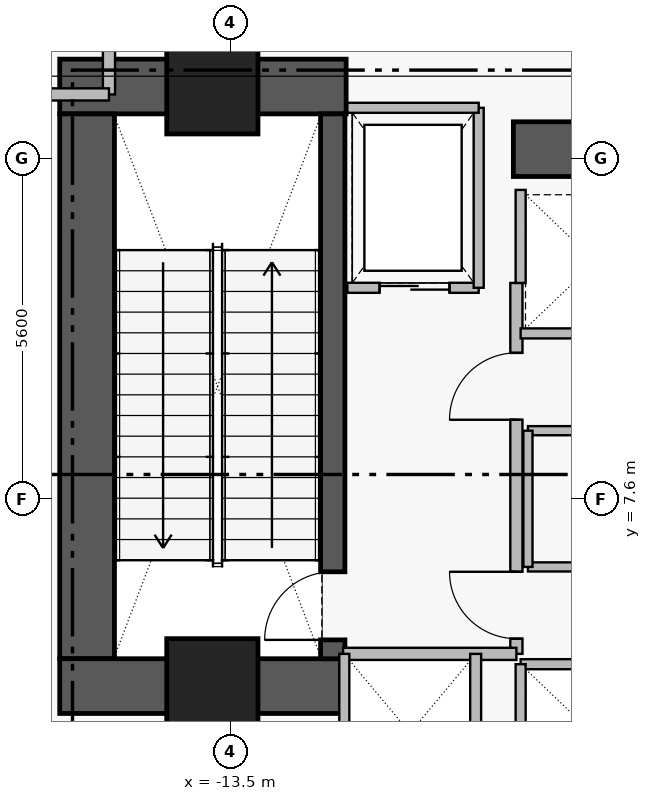
"""IFC4 building model, lengths in metres.
Left out: names, types, materials, properties, quantities, classifications, styles, units other than length and angle.
Written with IfcOpenShell. Run it as: python <this file> out.ifc"""

import sys

from ifc_helpers import new_model, si_unit, direction, frame, frame_2d, origin, origin_2d, place, context, subcontext, project, spatial, rectangle, extrude, element, fill, save


model = new_model("IFC4")
c1 = context("Model", 3, precision=1e-05, world=origin(), true_north=direction((0.0, 1.0)))
c2 = subcontext(c1, "Body", "Model", "MODEL_VIEW")
j1 = project(units=[si_unit("LENGTHUNIT", "METRE"), si_unit("PLANEANGLEUNIT", "RADIAN")], contexts=[c1])
p1 = place(None, origin())
s1 = spatial("IfcSite", under=j1, at=p1, CompositionType="ELEMENT")
p2 = place(p1, origin())
s2 = spatial("IfcBuilding", under=s1, at=p2, CompositionType="ELEMENT")
p3 = place(p2, frame((0.0, 0.0, 89.65)))
s3 = spatial("IfcBuildingStorey", under=s2, at=p3, CompositionType="ELEMENT", Elevation=89.65)
p4 = place(p3, frame((-16.31, 14.38, 0.0), z_axis=(0.0, 0.0, 1.0), x_axis=(1.0, 0.0, 0.0)))
e1 = element("IfcWall", 1, at=p4, inside=s3, PredefinedType="SHEAR", context=c2, shape_type="SweptSolid", body=[
    extrude(rectangle(XDim=4.71, YDim=0.9, at=frame_2d((2.355, 0.0))), origin(), (0.0, 0.0, 1.0), 5.81),
])
p5 = place(p3, frame((-15.86, 4.97, 0.0), z_axis=(0.0, 0.0, 1.0), x_axis=(0.0, 1.0, 0.0)))
e2 = element("IfcWall", 2, at=p5, inside=s3, PredefinedType="SHEAR", context=c2, shape_type="SweptSolid", body=[
    extrude(rectangle(XDim=8.96, YDim=0.9, at=frame_2d((4.48, 0.0))), origin(), (0.0, 0.0, 1.0), 5.81),
])
p6 = place(p3, frame((-16.31, 4.52, 0.0), z_axis=(0.0, 0.0, 1.0), x_axis=(1.0, 0.0, 0.0)))
e3 = element("IfcWall", 3, at=p6, inside=s3, PredefinedType="SHEAR", context=c2, shape_type="SweptSolid", body=[
    extrude(rectangle(XDim=4.71, YDim=0.9, at=frame_2d((2.355, 0.0))), origin(), (0.0, 0.0, 1.0), 5.81),
])
p7 = place(p3, frame((-8.85, 13.35, 0.0), z_axis=(0.0, 0.0, 1.0), x_axis=(1.0, 0.0, 0.0)))
e4 = element("IfcWall", 4, at=p7, inside=s3, PredefinedType="SHEAR", context=c2, shape_type="SweptSolid", body=[
    extrude(rectangle(XDim=7.6, YDim=0.9, at=frame_2d((3.8, 0.0))), origin(), (0.0, 0.0, 1.0), 5.74),
])
p8 = place(p3, frame((-11.82, 4.97, 0.0), z_axis=(0.0, 0.0, 1.0), x_axis=(0.0, 1.0, 0.0)))
e5 = element("IfcWall", 5, at=p8, inside=s3, PredefinedType="SHEAR", context=c2, shape_type="SweptSolid", body=[
    extrude(rectangle(XDim=8.96, YDim=0.4, at=frame_2d((4.48, 0.0))), origin(), (0.0, 0.0, 1.0), 5.81),
])
p9 = place(p8, frame((0.31, 0.0, 0.0)))
e6 = element("IfcOpeningElement", 6, at=p9, cuts=e5, PredefinedType="OPENING", context=c2, shape_type="SweptSolid", body=[
    extrude(rectangle(XDim=1.12, YDim=2.22, at=frame_2d((0.56, 1.11))), frame((0.0, 0.21, 0.0), z_axis=(0.0, -1.0, 0.0), x_axis=(1.0, 0.0, 0.0)), (0.0, 0.0, 1.0), 0.42),
])
for number, where, z_axis, x_axis in (
    (7, (-13.8, 14.35, 0.0), (0.0, 0.0, 1.0), (1.0, 0.0, 0.0)),
    (8, (-13.8, 4.55, 0.0), (0.0, 0.0, 1.0), (1.0, 0.0, 0.0)),
):
    element("IfcColumn", number, at=place(p3, frame(where, z_axis=z_axis, x_axis=x_axis)), inside=s3, PredefinedType="COLUMN", context=c2, shape_type="SweptSolid", body=[
        extrude(rectangle(XDim=1.5, YDim=1.5, at=origin_2d()), origin(), (0.0, 0.0, 1.0), 6.0),
    ])
p10 = place(p3, frame((-8.8, 5.05, 0.0), z_axis=(0.0, 0.0, 1.0), x_axis=(0.0, 1.0, 0.0)))
e9 = element("IfcWall", 9, at=p10, inside=s3, PredefinedType="PARTITIONING", context=c2, shape_type="SweptSolid", body=[
    extrude(rectangle(XDim=6.1, YDim=0.2, at=frame_2d((3.05, 0.0))), origin(), (0.0, 0.0, 1.0), 5.74),
])
p11 = place(p10, frame((0.25, 0.0, 0.0)))
e10 = element("IfcOpeningElement", 10, at=p11, cuts=e9, PredefinedType="OPENING", context=c2, shape_type="SweptSolid", body=[
    extrude(rectangle(XDim=1.1, YDim=2.2, at=frame_2d((0.55, 1.1))), frame((0.0, 0.11, 0.0), z_axis=(0.0, -1.0, 0.0), x_axis=(1.0, 0.0, 0.0)), (0.0, 0.0, 1.0), 0.22),
])
p12 = place(p10, frame((3.85, 0.0, 0.0)))
e11 = element("IfcOpeningElement", 11, at=p12, cuts=e9, PredefinedType="OPENING", context=c2, shape_type="SweptSolid", body=[
    extrude(rectangle(XDim=1.1, YDim=2.2, at=frame_2d((0.55, 1.1))), frame((0.0, 0.11, 0.0), z_axis=(0.0, -1.0, 0.0), x_axis=(1.0, 0.0, 0.0)), (0.0, 0.0, 1.0), 0.22),
])
p13 = place(p3, frame((-11.58, 11.07, 0.0), z_axis=(0.0, 0.0, 1.0), x_axis=(1.0, 0.0, 0.0)))
e12 = element("IfcWall", 12, at=p13, inside=s3, PredefinedType="PARTITIONING", context=c2, shape_type="SweptSolid", body=[
    extrude(rectangle(XDim=2.16, YDim=0.165, at=frame_2d((1.08, 0.0))), origin(), (0.0, 0.0, 1.0), 5.74),
])
p14 = place(p13, frame((0.53, 0.0, 0.0)))
e13 = element("IfcOpeningElement", 13, at=p14, cuts=e12, PredefinedType="OPENING", context=c2, shape_type="SweptSolid", body=[
    extrude(rectangle(XDim=1.15, YDim=2.25, at=frame_2d((0.575, 1.125))), frame((0.0, 0.093, 0.0), z_axis=(0.0, -1.0, 0.0), x_axis=(1.0, 0.0, 0.0)), (0.0, 0.0, 1.0), 0.185),
])
p15 = place(p3, frame((-8.61, 6.48, 0.0), z_axis=(0.0, 0.0, 1.0), x_axis=(1.0, 0.0, 0.0)))
e14 = element("IfcWall", 14, at=p15, inside=s3, PredefinedType="PARTITIONING", context=c2, shape_type="SweptSolid", body=[
    extrude(rectangle(XDim=7.29, YDim=0.15, at=frame_2d((3.645, 0.0))), origin(), (0.0, 0.0, 1.0), 5.74),
])
p16 = place(p15, frame((3.195, 0.0, 0.0)))
e15 = element("IfcOpeningElement", 15, at=p16, cuts=e14, PredefinedType="OPENING", context=c2, shape_type="SweptSolid", body=[
    extrude(rectangle(XDim=0.9, YDim=2.15, at=frame_2d((0.45, 1.075))), frame((0.0, 0.085, 0.0), z_axis=(0.0, -1.0, 0.0), x_axis=(1.0, 0.0, 0.0)), (0.0, 0.0, 1.0), 0.17),
])
p17 = place(p3, frame((-15.5, 14.25, 0.0), z_axis=(0.0, 0.0, 1.0), x_axis=(0.0, 1.0, 0.0)))
e16 = element("IfcWall", 16, at=p17, inside=s3, PredefinedType="PARTITIONING", context=c2, shape_type="SweptSolid", body=[
    extrude(rectangle(XDim=5.05, YDim=0.2, at=frame_2d((2.525, 0.0))), origin(), (0.0, 0.0, 1.0), 5.74),
])
p18 = place(p17, frame((1.25, 0.0, 0.0)))
e17 = element("IfcOpeningElement", 17, at=p18, cuts=e16, PredefinedType="OPENING", context=c2, shape_type="SweptSolid", body=[
    extrude(rectangle(XDim=1.1, YDim=2.2, at=frame_2d((0.55, 1.1))), frame((0.0, 0.11, 0.0), z_axis=(0.0, -1.0, 0.0), x_axis=(1.0, 0.0, 0.0)), (0.0, 0.0, 1.0), 0.22),
])
p19 = place(p3, frame((-11.65, 5.05, 0.0), z_axis=(0.0, 0.0, 1.0), x_axis=(1.0, 0.0, 0.0)))
e18 = element("IfcWall", 18, at=p19, inside=s3, PredefinedType="PARTITIONING", context=c2, shape_type="SweptSolid", body=[
    extrude(rectangle(XDim=2.85, YDim=0.2, at=frame_2d((1.425, 0.0))), origin(), (0.0, 0.0, 1.0), 5.74),
])
p20 = place(p3, frame((-9.42, 11.07, 0.0), z_axis=(0.0, 0.0, 1.0), x_axis=(0.0, 1.0, 0.0)))
e19 = element("IfcWall", 19, at=p20, inside=s3, PredefinedType="PARTITIONING", context=c2, shape_type="SweptSolid", body=[
    extrude(rectangle(XDim=2.96, YDim=0.165, at=frame_2d((1.48, 0.0))), origin(), (0.0, 0.0, 1.0), 5.74),
])
p21 = place(p3, frame((-11.58, 14.03, 0.0), z_axis=(0.0, 0.0, 1.0), x_axis=(1.0, 0.0, 0.0)))
e20 = element("IfcWall", 20, at=p21, inside=s3, PredefinedType="PARTITIONING", context=c2, shape_type="SweptSolid", body=[
    extrude(rectangle(XDim=2.16, YDim=0.165, at=frame_2d((1.08, 0.0))), origin(), (0.0, 0.0, 1.0), 5.74),
])
p22 = place(p3, frame((-8.73, 4.88, 0.0), z_axis=(0.0, 0.0, 1.0), x_axis=(1.0, 0.0, 0.0)))
e21 = element("IfcWall", 21, at=p22, inside=s3, PredefinedType="PARTITIONING", context=c2, shape_type="SweptSolid", body=[
    extrude(rectangle(XDim=2.48, YDim=0.165, at=frame_2d((1.24, 0.0))), origin(), (0.0, 0.0, 1.0), 5.74),
])
p23 = place(p3, frame((-8.73, 2.52, 0.0), z_axis=(0.0, 0.0, 1.0), x_axis=(0.0, 1.0, 0.0)))
e22 = element("IfcWall", 22, at=p23, inside=s3, PredefinedType="PARTITIONING", context=c2, shape_type="SweptSolid", body=[
    extrude(rectangle(XDim=2.36, YDim=0.165, at=frame_2d((1.18, 0.0))), origin(), (0.0, 0.0, 1.0), 5.74),
])
p24 = place(p3, frame((-8.73, 10.32, 0.0), z_axis=(0.0, 0.0, 1.0), x_axis=(1.0, 0.0, 0.0)))
e23 = element("IfcWall", 23, at=p24, inside=s3, PredefinedType="PARTITIONING", context=c2, shape_type="SweptSolid", body=[
    extrude(rectangle(XDim=2.48, YDim=0.165, at=frame_2d((1.24, 0.0))), origin(), (0.0, 0.0, 1.0), 5.74),
])
p25 = place(p3, frame((-8.73, 11.15, 0.0), z_axis=(0.0, 0.0, 1.0), x_axis=(0.0, 1.0, 0.0)))
e24 = element("IfcWall", 24, at=p25, inside=s3, PredefinedType="PARTITIONING", context=c2, shape_type="SweptSolid", body=[
    extrude(rectangle(XDim=1.53, YDim=0.165, at=frame_2d((0.765, 0.0))), origin(), (0.0, 0.0, 1.0), 5.74),
])
p26 = place(p3, frame((-9.47, 2.45, 0.0), z_axis=(0.0, 0.0, 1.0), x_axis=(0.0, 1.0, 0.0)))
e25 = element("IfcWall", 25, at=p26, inside=s3, PredefinedType="PARTITIONING", context=c2, shape_type="SweptSolid", body=[
    extrude(rectangle(XDim=2.6, YDim=0.18, at=frame_2d((1.3, 0.0))), origin(), (0.0, 0.0, 1.0), 5.74),
])
p27 = place(p3, frame((-11.63, 2.47, 0.0), z_axis=(0.0, 0.0, 1.0), x_axis=(0.0, 1.0, 0.0)))
e26 = element("IfcWall", 26, at=p27, inside=s3, PredefinedType="PARTITIONING", context=c2, shape_type="SweptSolid", body=[
    extrude(rectangle(XDim=2.58, YDim=0.165, at=frame_2d((1.29, 0.0))), origin(), (0.0, 0.0, 1.0), 5.74),
])
p28 = place(p3, frame((-8.61, 8.72, 0.0), z_axis=(0.0, 0.0, 1.0), x_axis=(1.0, 0.0, 0.0)))
e27 = element("IfcWall", 27, at=p28, inside=s3, PredefinedType="PARTITIONING", context=c2, shape_type="SweptSolid", body=[
    extrude(rectangle(XDim=7.29, YDim=0.15, at=frame_2d((3.645, 0.0))), origin(), (0.0, 0.0, 1.0), 5.74),
])
p29 = place(p3, frame((-8.61, 6.48, 0.0), z_axis=(0.0, 0.0, 1.0), x_axis=(0.0, 1.0, 0.0)))
e28 = element("IfcWall", 28, at=p29, inside=s3, PredefinedType="PARTITIONING", context=c2, shape_type="SweptSolid", body=[
    extrude(rectangle(XDim=2.24, YDim=0.15, at=frame_2d((1.12, 0.0))), origin(), (0.0, 0.0, 1.0), 5.74),
])
p30 = place(p3, frame((-20.5, 14.25, 0.0), z_axis=(0.0, 0.0, 1.0), x_axis=(1.0, 0.0, 0.0)))
e29 = element("IfcWall", 29, at=p30, inside=s3, PredefinedType="PARTITIONING", context=c2, shape_type="SweptSolid", body=[
    extrude(rectangle(XDim=5.0, YDim=0.2, at=frame_2d((2.5, 0.0))), origin(), (0.0, 0.0, 1.0), 5.74),
])
p31 = place(p9, origin())
e30 = element("IfcDoor", 30, at=p31, inside=s3, OperationType="SINGLE_SWING_LEFT", PredefinedType="DOOR", context=c2, shape_type="SweptSolid", body=[
    extrude(rectangle(XDim=1.12, YDim=2.22, at=frame_2d((0.56, 1.11))), frame((0.0, 0.025, 0.0), z_axis=(0.0, -1.0, 0.0), x_axis=(1.0, 0.0, 0.0)), (0.0, 0.0, 1.0), 0.05),
])
fill(e6, e30)
p32 = place(p11, origin())
e31 = element("IfcDoor", 31, at=p32, inside=s3, OperationType="SINGLE_SWING_RIGHT", PredefinedType="DOOR", context=c2, shape_type="SweptSolid", body=[
    extrude(rectangle(XDim=1.1, YDim=2.2, at=frame_2d((0.55, 1.1))), frame((0.0, 0.025, 0.0), z_axis=(0.0, -1.0, 0.0), x_axis=(1.0, 0.0, 0.0)), (0.0, 0.0, 1.0), 0.05),
])
fill(e10, e31)
p33 = place(p12, origin())
e32 = element("IfcDoor", 32, at=p33, inside=s3, OperationType="SINGLE_SWING_LEFT", PredefinedType="DOOR", context=c2, shape_type="SweptSolid", body=[
    extrude(rectangle(XDim=1.1, YDim=2.2, at=frame_2d((0.55, 1.1))), frame((0.0, 0.025, 0.0), z_axis=(0.0, -1.0, 0.0), x_axis=(1.0, 0.0, 0.0)), (0.0, 0.0, 1.0), 0.05),
])
fill(e11, e32)
p34 = place(p14, origin())
e33 = element("IfcDoor", 33, at=p34, inside=s3, OperationType="SLIDING_TO_LEFT", PredefinedType="DOOR", context=c2, shape_type="SweptSolid", body=[
    extrude(rectangle(XDim=1.15, YDim=2.25, at=frame_2d((0.575, 1.125))), frame((0.0, 0.025, 0.0), z_axis=(0.0, -1.0, 0.0), x_axis=(1.0, 0.0, 0.0)), (0.0, 0.0, 1.0), 0.05),
])
fill(e13, e33)
save(model, sys.argv[1])
